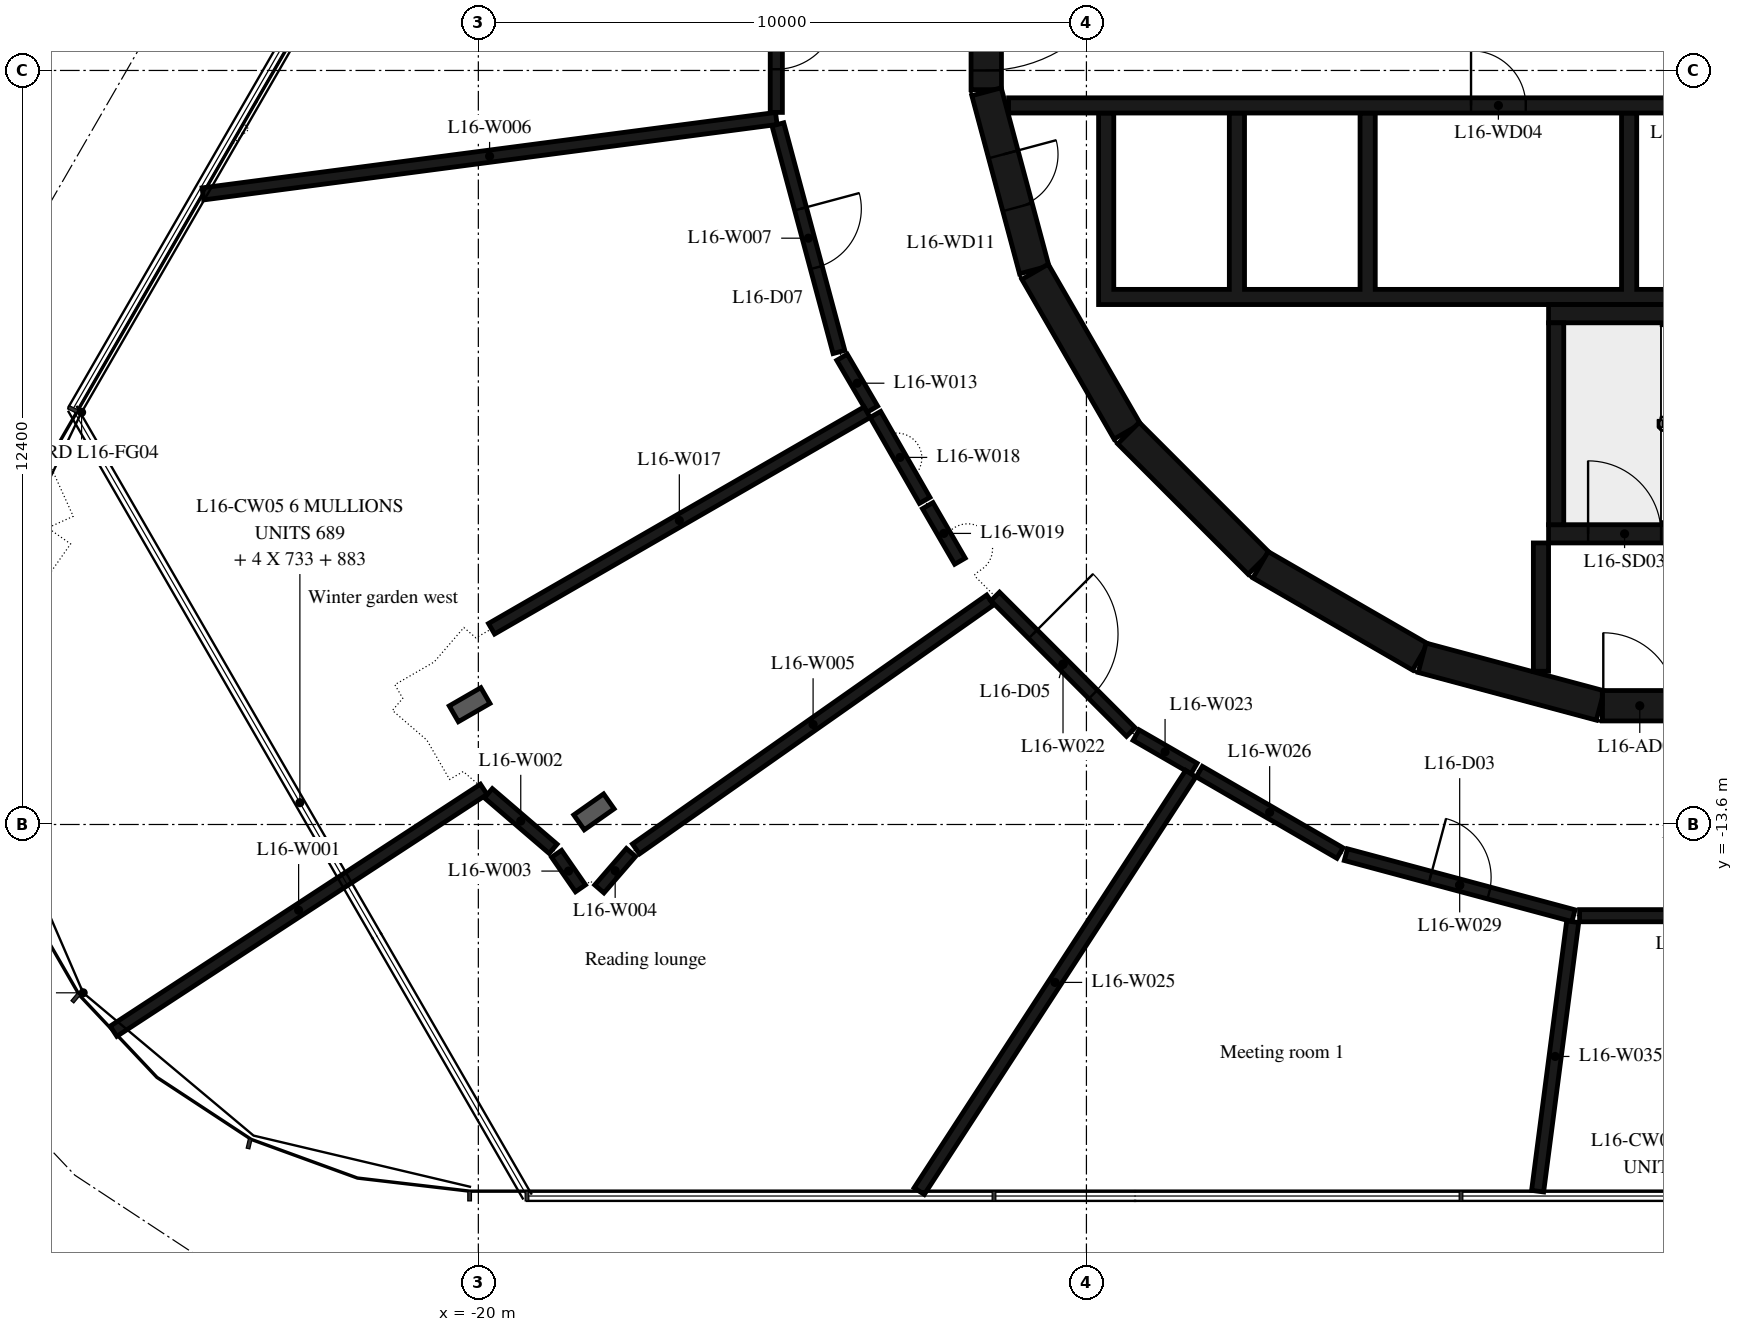
"""IFC4 building model, lengths in metres.
Left out: names, types, materials, properties, quantities, classifications, styles, units other than length and angle.
Written with IfcOpenShell. Run it as: python <this file> out.ifc"""

import sys

from ifc_helpers import new_model, si_unit, direction, frame, frame_2d, origin, place, context, subcontext, project, spatial, polyline, rectangle, outline, extrude, element, fill, save


model = new_model("IFC4")
c1 = context("Model", 3, precision=1e-05, world=origin(), true_north=direction((0.0, 1.0)))
c2 = subcontext(c1, "Body", "Model", "MODEL_VIEW")
j1 = project(units=[si_unit("LENGTHUNIT", "METRE"), si_unit("PLANEANGLEUNIT", "RADIAN")], contexts=[c1])
p1 = place(None, origin())
s1 = spatial("IfcSite", under=j1, at=p1, CompositionType="ELEMENT")
p2 = place(p1, origin())
s2 = spatial("IfcBuilding", under=s1, at=p2, CompositionType="ELEMENT")
p3 = place(p2, frame((0.0, 0.0, 69.9)))
s3 = spatial("IfcBuildingStorey", under=s2, at=p3, CompositionType="ELEMENT", Elevation=69.9)
p4 = place(p3, frame((-11.647, 1.516, 0.0), z_axis=(0.0, 0.0, 1.0), x_axis=(0.0, -1.0, 0.0)))
e1 = element("IfcWall", 1, at=p4, inside=s3, PredefinedType="SHEAR", context=c2, shape_type="SweptSolid", body=[
    extrude(rectangle(XDim=3.033, YDim=0.5, at=frame_2d((1.516, 0.0))), origin(), (0.0, 0.0, 1.0), 6.35),
])
p5 = place(p4, frame((0.316, 0.0, 0.0)))
e2 = element("IfcOpeningElement", 2, at=p5, cuts=e1, PredefinedType="OPENING", context=c2, shape_type="SweptSolid", body=[
    extrude(rectangle(XDim=2.4, YDim=2.1, at=frame_2d((1.2, 1.05))), frame((0.0, 0.26, 0.0), z_axis=(0.0, -1.0, 0.0), x_axis=(1.0, 0.0, 0.0)), (0.0, 0.0, 1.0), 0.52),
])
p6 = place(p3, frame((-11.643, -1.55, 0.0), z_axis=(0.0, 0.0, 1.0), x_axis=(0.258734743916, -0.965948410781, 0.0)))
e3 = element("IfcWall", 3, at=p6, inside=s3, PredefinedType="SHEAR", context=c2, shape_type="SweptSolid", body=[
    extrude(rectangle(XDim=3.033, YDim=0.5, at=frame_2d((1.516, 0.0))), origin(), (0.0, 0.0, 1.0), 6.35),
])
p7 = place(p6, frame((1.066, 0.0, 0.0)))
e4 = element("IfcOpeningElement", 4, at=p7, cuts=e3, PredefinedType="OPENING", context=c2, shape_type="SweptSolid", body=[
    extrude(rectangle(XDim=0.9, YDim=2.1, at=frame_2d((0.45, 1.05))), frame((0.0, 0.26, 0.0), z_axis=(0.0, -1.0, 0.0), x_axis=(1.0, 0.0, 0.0)), (0.0, 0.0, 1.0), 0.52),
])
p8 = place(p3, frame((-10.845, -4.51, 0.0), z_axis=(0.0, 0.0, 1.0), x_axis=(0.500087131594, -0.865975092491, 0.0)))
e5 = element("IfcWall", 5, at=p8, inside=s3, PredefinedType="SHEAR", context=c2, shape_type="SweptSolid", body=[
    extrude(rectangle(XDim=3.033, YDim=0.5, at=frame_2d((1.516, 0.0))), origin(), (0.0, 0.0, 1.0), 6.35),
])
p9 = place(p3, frame((-9.308, -7.164, 0.0), z_axis=(0.0, 0.0, 1.0), x_axis=(0.707106781187, -0.707106781187, 0.0)))
e6 = element("IfcWall", 6, at=p9, inside=s3, PredefinedType="SHEAR", context=c2, shape_type="SweptSolid", body=[
    extrude(rectangle(XDim=3.032, YDim=0.5, at=frame_2d((1.516, 0.0))), origin(), (0.0, 0.0, 1.0), 6.35),
])
for number, where, z_axis, x_axis in (
    (7, (-7.137, -9.329, 0.0), (0.0, 0.0, 1.0), (0.866, -0.5, 0.0)),
    (8, (-4.479, -10.858, 0.0), (0.0, 0.0, 1.0), (0.966, -0.259, 0.0)),
):
    element("IfcWall", number, at=place(p3, frame(where, z_axis=z_axis, x_axis=x_axis)), inside=s3, PredefinedType="SHEAR", context=c2, shape_type="SweptSolid", body=[
        extrude(rectangle(XDim=3.033, YDim=0.5, at=frame_2d((1.516, 0.0))), origin(), (0.0, 0.0, 1.0), 6.35),
    ])
p10 = place(p3, frame((-1.516, -11.647, 0.0), z_axis=(0.0, 0.0, 1.0), x_axis=(1.0, 0.0, 0.0)))
e9 = element("IfcWall", 9, at=p10, inside=s3, PredefinedType="SHEAR", context=c2, shape_type="SweptSolid", body=[
    extrude(rectangle(XDim=3.033, YDim=0.5, at=frame_2d((1.516, 0.0))), origin(), (0.0, 0.0, 1.0), 6.35),
])
p11 = place(p10, frame((0.016, 0.0, 0.0)))
e10 = element("IfcOpeningElement", 10, at=p11, cuts=e9, PredefinedType="OPENING", context=c2, shape_type="SweptSolid", body=[
    extrude(rectangle(XDim=1.2, YDim=2.1, at=frame_2d((0.6, 1.05))), frame((0.0, 0.26, 0.0), z_axis=(0.0, -1.0, 0.0), x_axis=(1.0, 0.0, 0.0)), (0.0, 0.0, 1.0), 0.52),
])
p12 = place(p3, frame((-2.275, -8.67, 0.0), z_axis=(0.0, 0.0, 1.0), x_axis=(0.0, 1.0, 0.0)))
e11 = element("IfcWall", 11, at=p12, inside=s3, PredefinedType="SHEAR", context=c2, shape_type="SweptSolid", body=[
    extrude(rectangle(XDim=3.32, YDim=0.25, at=frame_2d((1.66, 0.0))), origin(), (0.0, 0.0, 1.0), 6.35),
])
p13 = place(p3, frame((-2.4, -5.2, 0.0), z_axis=(0.0, 0.0, 1.0), x_axis=(1.0, 0.0, 0.0)))
e12 = element("IfcWall", 12, at=p13, inside=s3, PredefinedType="SHEAR", context=c2, shape_type="SweptSolid", body=[
    extrude(rectangle(XDim=7.05, YDim=0.3, at=frame_2d((3.525, 0.0))), origin(), (0.0, 0.0, 1.0), 6.35),
])
p14 = place(p3, frame((-2.4, -8.82, 0.0), z_axis=(0.0, 0.0, 1.0), x_axis=(1.0, 0.0, 0.0)))
e13 = element("IfcWall", 13, at=p14, inside=s3, PredefinedType="SHEAR", context=c2, shape_type="SweptSolid", body=[
    extrude(rectangle(XDim=2.5, YDim=0.3, at=frame_2d((1.25, 0.0))), origin(), (0.0, 0.0, 1.0), 6.35),
])
p15 = place(p14, frame((0.65, 0.0, 0.0)))
e14 = element("IfcOpeningElement", 14, at=p15, cuts=e13, PredefinedType="OPENING", context=c2, shape_type="SweptSolid", body=[
    extrude(rectangle(XDim=1.2, YDim=2.1, at=frame_2d((0.6, 1.05))), frame((0.0, 0.16, 0.0), z_axis=(0.0, -1.0, 0.0), x_axis=(1.0, 0.0, 0.0)), (0.0, 0.0, 1.0), 0.32),
])
p16 = place(p3, frame((-2.525, -8.97, 0.0), z_axis=(0.0, 0.0, 1.0), x_axis=(0.0, -1.0, 0.0)))
e15 = element("IfcWall", 15, at=p16, inside=s3, PredefinedType="SHEAR", context=c2, shape_type="SweptSolid", body=[
    extrude(rectangle(XDim=2.11, YDim=0.25, at=frame_2d((1.055, 0.0))), origin(), (0.0, 0.0, 1.0), 6.35),
])
p17 = place(p3, origin())
e16 = element("IfcWall", 16, at=p17, inside=s3, PredefinedType="SHEAR", context=c2, shape_type="SweptSolid", body=[
    extrude(outline(polyline([(9.8, -5.05), (9.8, -4.8), (9.8, -1.9), (9.55, -1.9), (9.55, -4.8), (7.65, -4.8), (7.65, -1.9), (7.4, -1.9), (7.4, -4.8), (5.5, -4.8), (5.5, -1.9), (5.25, -1.9), (5.25, -4.8), (3.35, -4.8), (3.35, -1.9), (3.1, -1.9), (3.1, -4.8), (1.2, -4.8), (1.2, -1.9), (0.95, -1.9), (0.95, -4.8), (-0.95, -4.8), (-0.95, -1.9), (-1.2, -1.9), (-1.2, -4.8), (-5.25, -4.8), (-5.25, -1.9), (-5.5, -1.9), (-5.5, -4.8), (-7.4, -4.8), (-7.4, -1.9), (-7.65, -1.9), (-7.65, -4.8), (-9.55, -4.8), (-9.55, -1.9), (-9.8, -1.9), (-9.8, -4.8), (-9.8, -5.05), (9.8, -5.05)])), origin(), (0.0, 0.0, 1.0), 6.35),
])
p18 = place(p3, frame((-11.28, -1.775, 0.0), z_axis=(0.0, 0.0, 1.0), x_axis=(1.0, 0.0, 0.0)))
e17 = element("IfcWall", 17, at=p18, inside=s3, PredefinedType="SHEAR", context=c2, shape_type="SweptSolid", body=[
    extrude(rectangle(XDim=14.38, YDim=0.25, at=frame_2d((7.19, 0.0))), origin(), (0.0, 0.0, 1.0), 6.35),
])
p19 = place(p18, frame((7.605, 0.0, 0.0)))
e18 = element("IfcOpeningElement", 18, at=p19, cuts=e17, PredefinedType="OPENING", context=c2, shape_type="SweptSolid", body=[
    extrude(rectangle(XDim=0.9, YDim=2.1, at=frame_2d((0.45, 1.05))), frame((0.0, 0.135, 0.0), z_axis=(0.0, -1.0, 0.0), x_axis=(1.0, 0.0, 0.0)), (0.0, 0.0, 1.0), 0.27),
])
p20 = place(p18, frame((10.83, 0.0, 0.0)))
e19 = element("IfcOpeningElement", 19, at=p20, cuts=e17, PredefinedType="OPENING", context=c2, shape_type="SweptSolid", body=[
    extrude(rectangle(XDim=0.9, YDim=2.1, at=frame_2d((0.45, 1.05))), frame((0.0, 0.135, 0.0), z_axis=(0.0, -1.0, 0.0), x_axis=(1.0, 0.0, 0.0)), (0.0, 0.0, 1.0), 0.27),
])
p21 = place(p18, frame((12.98, 0.0, 0.0)))
e20 = element("IfcOpeningElement", 20, at=p21, cuts=e17, PredefinedType="OPENING", context=c2, shape_type="SweptSolid", body=[
    extrude(rectangle(XDim=0.9, YDim=2.1, at=frame_2d((0.45, 1.05))), frame((0.0, 0.135, 0.0), z_axis=(0.0, -1.0, 0.0), x_axis=(1.0, 0.0, 0.0)), (0.0, 0.0, 1.0), 0.27),
])
p22 = place(p3, frame((-19.911, -13.021, 0.0), z_axis=(0.0, 0.0, 1.0), x_axis=(-0.837091398282, -0.547063059366, 0.0)))
e21 = element("IfcWall", 21, at=p22, inside=s3, PredefinedType="PARTITIONING", context=c2, shape_type="SweptSolid", body=[
    extrude(rectangle(XDim=7.274, YDim=0.2, at=frame_2d((3.637, 0.0))), origin(), (0.0, 0.0, 1.0), 6.35),
])
p23 = place(p3, frame((-18.77, -14.0, 0.0), z_axis=(0.0, 0.0, 1.0), x_axis=(-0.758888143088, 0.651220996498, 0.0)))
e22 = element("IfcWall", 22, at=p23, inside=s3, PredefinedType="PARTITIONING", context=c2, shape_type="SweptSolid", body=[
    extrude(rectangle(XDim=1.404, YDim=0.2, at=frame_2d((0.702, 0.0))), origin(), (0.0, 0.0, 1.0), 6.35),
])
p24 = place(p3, frame((-18.713, -14.082, 0.0), z_axis=(0.0, 0.0, 1.0), x_axis=(0.569301912227, -0.822128537843, 0.0)))
e23 = element("IfcWall", 23, at=p24, inside=s3, PredefinedType="PARTITIONING", context=c2, shape_type="SweptSolid", body=[
    extrude(rectangle(XDim=0.69, YDim=0.2, at=frame_2d((0.345, 0.0))), origin(), (0.0, 0.0, 1.0), 6.35),
])
p25 = place(p3, frame((-18.01, -14.66, 0.0), z_axis=(0.0, 0.0, 1.0), x_axis=(0.655035903523, 0.755597753501, 0.0)))
e24 = element("IfcWall", 24, at=p25, inside=s3, PredefinedType="PARTITIONING", context=c2, shape_type="SweptSolid", body=[
    extrude(rectangle(XDim=0.794, YDim=0.2, at=frame_2d((0.397, 0.0))), origin(), (0.0, 0.0, 1.0), 6.35),
])
p26 = place(p3, frame((-17.408, -14.002, 0.0), z_axis=(0.0, 0.0, 1.0), x_axis=(0.818143313396, 0.575014363947, 0.0)))
e25 = element("IfcWall", 25, at=p26, inside=s3, PredefinedType="PARTITIONING", context=c2, shape_type="SweptSolid", body=[
    extrude(rectangle(XDim=7.122, YDim=0.2, at=frame_2d((3.561, 0.0))), origin(), (0.0, 0.0, 1.0), 6.35),
])
p27 = place(p3, frame((-15.1, -1.99, 0.0), z_axis=(0.0, 0.0, 1.0), x_axis=(-0.99146503856, -0.130372839634, 0.0)))
e26 = element("IfcWall", 26, at=p27, inside=s3, PredefinedType="PARTITIONING", context=c2, shape_type="SweptSolid", body=[
    extrude(rectangle(XDim=9.511, YDim=0.2, at=frame_2d((4.756, 0.0))), origin(), (0.0, 0.0, 1.0), 6.35),
])
p28 = place(p3, frame((-15.074, -2.087, 0.0), z_axis=(0.0, 0.0, 1.0), x_axis=(0.259026804199, -0.965870133458, 0.0)))
e27 = element("IfcWall", 27, at=p28, inside=s3, PredefinedType="PARTITIONING", context=c2, shape_type="SweptSolid", body=[
    extrude(rectangle(XDim=3.876, YDim=0.2, at=frame_2d((1.938, 0.0))), origin(), (0.0, 0.0, 1.0), 6.35),
])
p29 = place(p28, frame((1.438, 0.0, 0.0)))
e28 = element("IfcOpeningElement", 28, at=p29, cuts=e27, PredefinedType="OPENING", context=c2, shape_type="SweptSolid", body=[
    extrude(rectangle(XDim=1.0, YDim=2.1, at=frame_2d((0.5, 1.05))), frame((0.0, 0.11, 0.0), z_axis=(0.0, -1.0, 0.0), x_axis=(1.0, 0.0, 0.0)), (0.0, 0.0, 1.0), 0.22),
])
p30 = place(p3, frame((-15.1, 0.53, 0.0), z_axis=(0.0, 0.0, 1.0), x_axis=(0.0, -1.0, 0.0)))
e29 = element("IfcWall", 29, at=p30, inside=s3, PredefinedType="PARTITIONING", context=c2, shape_type="SweptSolid", body=[
    extrude(rectangle(XDim=2.42, YDim=0.2, at=frame_2d((1.21, 0.0))), origin(), (0.0, 0.0, 1.0), 6.35),
])
p31 = place(p30, frame((0.71, 0.0, 0.0)))
e30 = element("IfcOpeningElement", 30, at=p31, cuts=e29, PredefinedType="OPENING", context=c2, shape_type="SweptSolid", body=[
    extrude(rectangle(XDim=1.0, YDim=2.1, at=frame_2d((0.5, 1.05))), frame((0.0, 0.11, 0.0), z_axis=(0.0, -1.0, 0.0), x_axis=(1.0, 0.0, 0.0)), (0.0, 0.0, 1.0), 0.22),
])
p32 = place(p3, frame((-14.02, -5.916, 0.0), z_axis=(0.0, 0.0, 1.0), x_axis=(0.504990876894, -0.863124680596, 0.0)))
e31 = element("IfcWall", 31, at=p32, inside=s3, PredefinedType="PARTITIONING", context=c2, shape_type="SweptSolid", body=[
    extrude(rectangle(XDim=0.989, YDim=0.2, at=frame_2d((0.495, 0.0))), origin(), (0.0, 0.0, 1.0), 6.35),
])
p33 = place(p3, frame((-13.607, -6.82, 0.0), z_axis=(0.0, 0.0, 1.0), x_axis=(-0.866289323715, -0.499542598401, 0.0)))
e32 = element("IfcWall", 32, at=p33, inside=s3, PredefinedType="PARTITIONING", context=c2, shape_type="SweptSolid", body=[
    extrude(rectangle(XDim=7.13, YDim=0.2, at=frame_2d((3.565, 0.0))), origin(), (0.0, 0.0, 1.0), 6.35),
])
p34 = place(p3, frame((-13.47, -6.857, 0.0), z_axis=(0.0, 0.0, 1.0), x_axis=(0.49738110484, -0.867532153034, 0.0)))
e33 = element("IfcWall", 33, at=p34, inside=s3, PredefinedType="PARTITIONING", context=c2, shape_type="SweptSolid", body=[
    extrude(rectangle(XDim=1.629, YDim=0.2, at=frame_2d((0.814, 0.0))), origin(), (0.0, 0.0, 1.0), 6.35),
])
p35 = place(p3, frame((-12.61, -8.356, 0.0), z_axis=(0.0, 0.0, 1.0), x_axis=(0.501655813699, -0.865067306388, 0.0)))
e34 = element("IfcWall", 34, at=p35, inside=s3, PredefinedType="PARTITIONING", context=c2, shape_type="SweptSolid", body=[
    extrude(rectangle(XDim=1.056, YDim=0.2, at=frame_2d((0.528, 0.0))), origin(), (0.0, 0.0, 1.0), 6.35),
])
p36 = place(p3, frame((-11.5, -9.85, 0.0), z_axis=(0.0, 0.0, 1.0), x_axis=(0.707106781187, -0.707106781187, 0.0)))
e35 = element("IfcWall", 35, at=p36, inside=s3, PredefinedType="PARTITIONING", context=c2, shape_type="SweptSolid", body=[
    extrude(rectangle(XDim=3.154, YDim=0.2, at=frame_2d((1.577, 0.0))), origin(), (0.0, 0.0, 1.0), 6.35),
])
p37 = place(p36, frame((0.877, 0.0, 0.0)))
e36 = element("IfcOpeningElement", 36, at=p37, cuts=e35, PredefinedType="OPENING", context=c2, shape_type="SweptSolid", body=[
    extrude(rectangle(XDim=1.4, YDim=2.1, at=frame_2d((0.7, 1.05))), frame((0.0, 0.11, 0.0), z_axis=(0.0, -1.0, 0.0), x_axis=(1.0, 0.0, 0.0)), (0.0, 0.0, 1.0), 0.22),
])
p38 = place(p3, frame((-9.183, -12.13, 0.0), z_axis=(0.0, 0.0, 1.0), x_axis=(0.866174507562, -0.499741655707, 0.0)))
e37 = element("IfcWall", 37, at=p38, inside=s3, PredefinedType="PARTITIONING", context=c2, shape_type="SweptSolid", body=[
    extrude(rectangle(XDim=1.101, YDim=0.2, at=frame_2d((0.55, 0.0))), origin(), (0.0, 0.0, 1.0), 6.35),
])
p39 = place(p3, frame((-8.284, -12.764, 0.0), z_axis=(0.0, 0.0, 1.0), x_axis=(-0.54521987952, -0.838293077018, 0.0)))
e38 = element("IfcWall", 38, at=p39, inside=s3, PredefinedType="PARTITIONING", context=c2, shape_type="SweptSolid", body=[
    extrude(rectangle(XDim=8.19, YDim=0.2, at=frame_2d((4.095, 0.0))), origin(), (0.0, 0.0, 1.0), 6.35),
])
p40 = place(p3, frame((-8.144, -12.73, 0.0), z_axis=(0.0, 0.0, 1.0), x_axis=(0.865351249134, -0.5011658564, 0.0)))
e39 = element("IfcWall", 39, at=p40, inside=s3, PredefinedType="PARTITIONING", context=c2, shape_type="SweptSolid", body=[
    extrude(rectangle(XDim=2.673, YDim=0.2, at=frame_2d((1.337, 0.0))), origin(), (0.0, 0.0, 1.0), 6.35),
])
p41 = place(p3, frame((-5.733, -14.096, 0.0), z_axis=(0.0, 0.0, 1.0), x_axis=(0.96585437197, -0.259085569159, 0.0)))
e40 = element("IfcWall", 40, at=p41, inside=s3, PredefinedType="PARTITIONING", context=c2, shape_type="SweptSolid", body=[
    extrude(rectangle(XDim=3.876, YDim=0.2, at=frame_2d((1.938, 0.0))), origin(), (0.0, 0.0, 1.0), 6.35),
])
p42 = place(p41, frame((1.438, 0.0, 0.0)))
e41 = element("IfcOpeningElement", 41, at=p42, cuts=e40, PredefinedType="OPENING", context=c2, shape_type="SweptSolid", body=[
    extrude(rectangle(XDim=1.0, YDim=2.1, at=frame_2d((0.5, 1.05))), frame((0.0, 0.11, 0.0), z_axis=(0.0, -1.0, 0.0), x_axis=(1.0, 0.0, 0.0)), (0.0, 0.0, 1.0), 0.22),
])
p43 = place(p3, frame((-2.003, -15.199, 0.0), z_axis=(0.0, 0.0, 1.0), x_axis=(-0.129170993983, -0.991622334517, 0.0)))
e42 = element("IfcWall", 42, at=p43, inside=s3, PredefinedType="PARTITIONING", context=c2, shape_type="SweptSolid", body=[
    extrude(rectangle(XDim=4.468, YDim=0.2, at=frame_2d((2.234, 0.0))), origin(), (0.0, 0.0, 1.0), 6.35),
])
p44 = place(p3, frame((-1.89, -15.1, 0.0), z_axis=(0.0, 0.0, 1.0), x_axis=(1.0, 0.0, 0.0)))
e43 = element("IfcWall", 43, at=p44, inside=s3, PredefinedType="PARTITIONING", context=c2, shape_type="SweptSolid", body=[
    extrude(rectangle(XDim=3.88, YDim=0.2, at=frame_2d((1.94, 0.0))), origin(), (0.0, 0.0, 1.0), 6.35),
])
p45 = place(p44, frame((1.44, 0.0, 0.0)))
e44 = element("IfcOpeningElement", 44, at=p45, cuts=e43, PredefinedType="OPENING", context=c2, shape_type="SweptSolid", body=[
    extrude(rectangle(XDim=1.0, YDim=2.1, at=frame_2d((0.5, 1.05))), frame((0.0, 0.11, 0.0), z_axis=(0.0, -1.0, 0.0), x_axis=(1.0, 0.0, 0.0)), (0.0, 0.0, 1.0), 0.22),
])
p46 = place(p15, origin())
e45 = element("IfcDoor", 45, at=p46, inside=s3, OperationType="SINGLE_SWING_LEFT", PredefinedType="DOOR", context=c2, shape_type="SweptSolid", body=[
    extrude(rectangle(XDim=1.2, YDim=2.1, at=frame_2d((0.6, 1.05))), frame((0.0, 0.025, 0.0), z_axis=(0.0, -1.0, 0.0), x_axis=(1.0, 0.0, 0.0)), (0.0, 0.0, 1.0), 0.05),
])
fill(e14, e45)
p47 = place(p11, origin())
e46 = element("IfcDoor", 46, at=p47, inside=s3, OperationType="SINGLE_SWING_RIGHT", PredefinedType="DOOR", context=c2, shape_type="SweptSolid", body=[
    extrude(rectangle(XDim=1.2, YDim=2.1, at=frame_2d((0.6, 1.05))), frame((0.0, 0.025, 0.0), z_axis=(0.0, -1.0, 0.0), x_axis=(1.0, 0.0, 0.0)), (0.0, 0.0, 1.0), 0.05),
])
fill(e10, e46)
p48 = place(p5, origin())
e47 = element("IfcDoor", 47, at=p48, inside=s3, OperationType="DOUBLE_DOOR_SINGLE_SWING", PredefinedType="DOOR", context=c2, shape_type="SweptSolid", body=[
    extrude(rectangle(XDim=2.4, YDim=2.1, at=frame_2d((1.2, 1.05))), frame((0.0, 0.025, 0.0), z_axis=(0.0, -1.0, 0.0), x_axis=(1.0, 0.0, 0.0)), (0.0, 0.0, 1.0), 0.05),
])
fill(e2, e47)
p49 = place(p19, origin())
e48 = element("IfcDoor", 48, at=p49, inside=s3, OperationType="SINGLE_SWING_LEFT", PredefinedType="DOOR", context=c2, shape_type="SweptSolid", body=[
    extrude(rectangle(XDim=0.9, YDim=2.1, at=frame_2d((0.45, 1.05))), frame((0.0, 0.025, 0.0), z_axis=(0.0, -1.0, 0.0), x_axis=(1.0, 0.0, 0.0)), (0.0, 0.0, 1.0), 0.05),
])
fill(e18, e48)
p50 = place(p7, origin())
e49 = element("IfcDoor", 49, at=p50, inside=s3, OperationType="SINGLE_SWING_RIGHT", PredefinedType="DOOR", context=c2, shape_type="SweptSolid", body=[
    extrude(rectangle(XDim=0.9, YDim=2.1, at=frame_2d((0.45, 1.05))), frame((0.0, 0.025, 0.0), z_axis=(0.0, -1.0, 0.0), x_axis=(1.0, 0.0, 0.0)), (0.0, 0.0, 1.0), 0.05),
])
fill(e4, e49)
p51 = place(p42, origin())
e50 = element("IfcDoor", 50, at=p51, inside=s3, OperationType="SINGLE_SWING_LEFT", PredefinedType="DOOR", context=c2, shape_type="SweptSolid", body=[
    extrude(rectangle(XDim=1.0, YDim=2.1, at=frame_2d((0.5, 1.05))), frame((0.0, 0.025, 0.0), z_axis=(0.0, -1.0, 0.0), x_axis=(1.0, 0.0, 0.0)), (0.0, 0.0, 1.0), 0.05),
])
fill(e41, e50)
p52 = place(p37, origin())
e51 = element("IfcDoor", 51, at=p52, inside=s3, OperationType="DOUBLE_DOOR_SINGLE_SWING", PredefinedType="DOOR", context=c2, shape_type="SweptSolid", body=[
    extrude(rectangle(XDim=1.4, YDim=2.1, at=frame_2d((0.7, 1.05))), frame((0.0, 0.025, 0.0), z_axis=(0.0, -1.0, 0.0), x_axis=(1.0, 0.0, 0.0)), (0.0, 0.0, 1.0), 0.05),
])
fill(e36, e51)
p53 = place(p29, origin())
e52 = element("IfcDoor", 52, at=p53, inside=s3, OperationType="SINGLE_SWING_LEFT", PredefinedType="DOOR", context=c2, shape_type="SweptSolid", body=[
    extrude(rectangle(XDim=1.0, YDim=2.1, at=frame_2d((0.5, 1.05))), frame((0.0, 0.025, 0.0), z_axis=(0.0, -1.0, 0.0), x_axis=(1.0, 0.0, 0.0)), (0.0, 0.0, 1.0), 0.05),
])
fill(e28, e52)
p54 = place(p31, origin())
e53 = element("IfcDoor", 53, at=p54, inside=s3, OperationType="SINGLE_SWING_LEFT", PredefinedType="DOOR", context=c2, shape_type="SweptSolid", body=[
    extrude(rectangle(XDim=1.0, YDim=2.1, at=frame_2d((0.5, 1.05))), frame((0.0, 0.025, 0.0), z_axis=(0.0, -1.0, 0.0), x_axis=(1.0, 0.0, 0.0)), (0.0, 0.0, 1.0), 0.05),
])
fill(e30, e53)
save(model, sys.argv[1])
